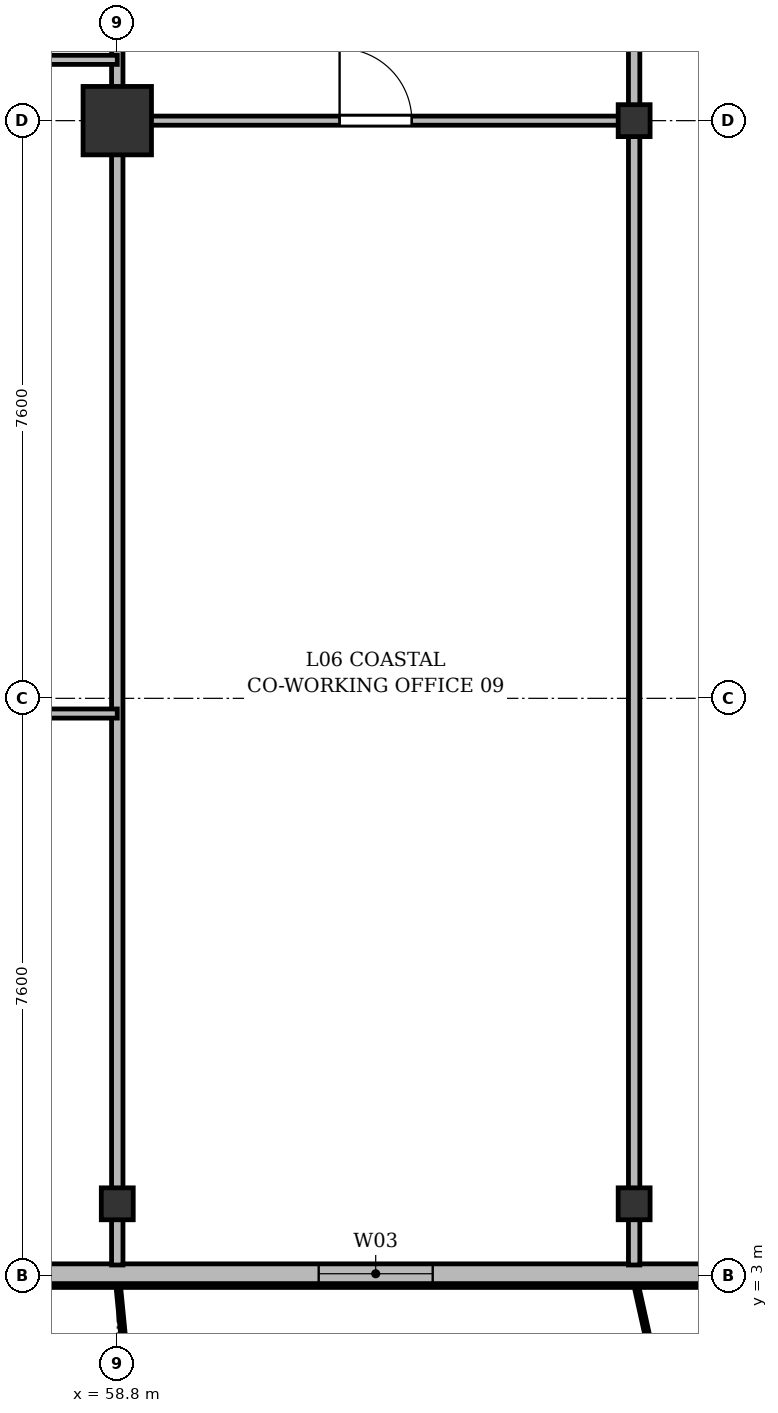
"""IFC4 building model, lengths in metres.
Left out: names, types, materials, properties, quantities, classifications, styles, units other than length and angle.
Written with IfcOpenShell. Run it as: python <this file> out.ifc"""

import sys

from ifc_helpers import new_model, si_unit, direction, frame, frame_2d, origin, origin_2d, place, context, subcontext, project, spatial, rectangle, i_section, extrude, source, transform, mapped, element, fill, save


model = new_model("IFC4")
c1 = context("Model", 3, precision=1e-05, world=origin(), true_north=direction((0.0, 1.0)))
c2 = subcontext(c1, "Body", "Model", "MODEL_VIEW")
j1 = project(units=[si_unit("LENGTHUNIT", "METRE"), si_unit("PLANEANGLEUNIT", "RADIAN")], contexts=[c1])
p1 = place(None, origin())
s1 = spatial("IfcSite", under=j1, at=p1, CompositionType="ELEMENT")
p2 = place(p1, origin())
s2 = spatial("IfcBuilding", under=s1, at=p2, CompositionType="ELEMENT")
p3 = place(p2, frame((0.0, 0.0, 27.1)))
s3 = spatial("IfcBuildingStorey", under=s2, at=p3, CompositionType="ELEMENT", Elevation=27.1)
m1 = source(origin(), c2, "Body", "SweptSolid", [
    extrude(i_section(OverallWidth=0.42, OverallDepth=0.42, WebThickness=0.026, FlangeThickness=0.04, at=origin_2d()), origin(), (0.0, 0.0, 1.0), 3.6),
])
p4 = place(p3, frame((58.8, 3.95, 0.0), z_axis=(0.0, 0.0, 1.0), x_axis=(1.0, 0.0, 0.0)))
e1 = element("IfcColumn", 1, at=p4, inside=s3, PredefinedType="COLUMN", context=c2, shape_type="MappedRepresentation", body=[
    mapped(m1, transform((0.0, 0.0, 0.0), x_axis=(1.0, 0.0, 0.0), y_axis=(0.0, 1.0, 0.0), z_axis=(0.0, 0.0, 1.0), scale=1.0)),
])
m2 = source(origin(), c2, "Body", "SweptSolid", [
    extrude(rectangle(XDim=0.9, YDim=0.9, at=origin_2d()), origin(), (0.0, 0.0, 1.0), 3.6),
])
p5 = place(p3, frame((58.8, 18.2, 0.0), z_axis=(0.0, 0.0, 1.0), x_axis=(1.0, 0.0, 0.0)))
e2 = element("IfcColumn", 2, at=p5, inside=s3, PredefinedType="COLUMN", context=c2, shape_type="MappedRepresentation", body=[
    mapped(m2, transform((0.0, 0.0, 0.0), x_axis=(1.0, 0.0, 0.0), y_axis=(0.0, 1.0, 0.0), z_axis=(0.0, 0.0, 1.0), scale=1.0)),
])
for number, where, z_axis, x_axis in (
    (3, (65.6, 3.95, 0.0), (0.0, 0.0, 1.0), (1.0, 0.0, 0.0)),
    (4, (65.6, 18.2, 0.0), (0.0, 0.0, 1.0), (1.0, 0.0, 0.0)),
):
    element("IfcColumn", number, at=place(p3, frame(where, z_axis=z_axis, x_axis=x_axis)), inside=s3, PredefinedType="COLUMN", context=c2, shape_type="MappedRepresentation", body=[
        mapped(m1, transform((0.0, 0.0, 0.0), x_axis=(1.0, 0.0, 0.0), y_axis=(0.0, 1.0, 0.0), z_axis=(0.0, 0.0, 1.0), scale=1.0)),
    ])
p6 = place(p3, frame((66.9, 3.03, 0.0), z_axis=(0.0, 0.0, 1.0), x_axis=(-1.0, 0.0, 0.0)))
e5 = element("IfcWall", 5, at=p6, inside=s3, PredefinedType="SOLIDWALL", context=c2, shape_type="SweptSolid", body=[
    extrude(rectangle(XDim=59.4, YDim=0.26, at=frame_2d((29.7, 0.0))), origin(), (0.0, 0.0, 1.0), 3.34),
])
p7 = place(p6, frame((3.95, 0.0, 0.9)))
e6 = element("IfcOpeningElement", 6, at=p7, cuts=e5, PredefinedType="OPENING", context=c2, shape_type="SweptSolid", body=[
    extrude(rectangle(XDim=1.5, YDim=1.75, at=frame_2d((0.75, 0.875))), frame((0.0, 0.14, 0.0), z_axis=(0.0, -1.0, 0.0), x_axis=(1.0, 0.0, 0.0)), (0.0, 0.0, 1.0), 0.28),
])
p8 = place(p6, frame((9.05, 0.0, 0.9)))
e7 = element("IfcOpeningElement", 7, at=p8, cuts=e5, PredefinedType="OPENING", context=c2, shape_type="SweptSolid", body=[
    extrude(rectangle(XDim=2.0, YDim=1.95, at=frame_2d((1.0, 0.975))), frame((0.0, 0.14, 0.0), z_axis=(0.0, -1.0, 0.0), x_axis=(1.0, 0.0, 0.0)), (0.0, 0.0, 1.0), 0.28),
])
p9 = place(p6, frame((13.125, 0.0, 0.9)))
e8 = element("IfcOpeningElement", 8, at=p9, cuts=e5, PredefinedType="OPENING", context=c2, shape_type="SweptSolid", body=[
    extrude(rectangle(XDim=1.65, YDim=1.85, at=frame_2d((0.825, 0.925))), frame((0.0, 0.14, 0.0), z_axis=(0.0, -1.0, 0.0), x_axis=(1.0, 0.0, 0.0)), (0.0, 0.0, 1.0), 0.28),
])
p10 = place(p6, frame((17.007, 0.0, 0.0)))
e9 = element("IfcOpeningElement", 9, at=p10, cuts=e5, PredefinedType="OPENING", context=c2, shape_type="SweptSolid", body=[
    extrude(rectangle(XDim=1.2, YDim=2.2, at=frame_2d((0.6, 1.1))), frame((0.0, 0.14, 0.0), z_axis=(0.0, -1.0, 0.0), x_axis=(1.0, 0.0, 0.0)), (0.0, 0.0, 1.0), 0.28),
])
p11 = place(p6, frame((20.2, 0.0, 0.9)))
e10 = element("IfcOpeningElement", 10, at=p11, cuts=e5, PredefinedType="OPENING", context=c2, shape_type="SweptSolid", body=[
    extrude(rectangle(XDim=2.2, YDim=1.8, at=frame_2d((1.1, 0.9))), frame((0.0, 0.14, 0.0), z_axis=(0.0, -1.0, 0.0), x_axis=(1.0, 0.0, 0.0)), (0.0, 0.0, 1.0), 0.28),
])
p12 = place(p6, frame((24.0, 0.0, 0.9)))
e11 = element("IfcOpeningElement", 11, at=p12, cuts=e5, PredefinedType="OPENING", context=c2, shape_type="SweptSolid", body=[
    extrude(rectangle(XDim=1.5, YDim=1.75, at=frame_2d((0.75, 0.875))), frame((0.0, 0.14, 0.0), z_axis=(0.0, -1.0, 0.0), x_axis=(1.0, 0.0, 0.0)), (0.0, 0.0, 1.0), 0.28),
])
p13 = place(p6, frame((27.05, 0.0, 0.9)))
e12 = element("IfcOpeningElement", 12, at=p13, cuts=e5, PredefinedType="OPENING", context=c2, shape_type="SweptSolid", body=[
    extrude(rectangle(XDim=2.0, YDim=1.95, at=frame_2d((1.0, 0.975))), frame((0.0, 0.14, 0.0), z_axis=(0.0, -1.0, 0.0), x_axis=(1.0, 0.0, 0.0)), (0.0, 0.0, 1.0), 0.28),
])
p14 = place(p6, frame((32.175, 0.0, 0.9)))
e13 = element("IfcOpeningElement", 13, at=p14, cuts=e5, PredefinedType="OPENING", context=c2, shape_type="SweptSolid", body=[
    extrude(rectangle(XDim=1.65, YDim=1.85, at=frame_2d((0.825, 0.925))), frame((0.0, 0.14, 0.0), z_axis=(0.0, -1.0, 0.0), x_axis=(1.0, 0.0, 0.0)), (0.0, 0.0, 1.0), 0.28),
])
p15 = place(p6, frame((36.6, 0.0, 0.9)))
e14 = element("IfcOpeningElement", 14, at=p15, cuts=e5, PredefinedType="OPENING", context=c2, shape_type="SweptSolid", body=[
    extrude(rectangle(XDim=1.8, YDim=1.8, at=frame_2d((0.9, 0.9))), frame((0.0, 0.14, 0.0), z_axis=(0.0, -1.0, 0.0), x_axis=(1.0, 0.0, 0.0)), (0.0, 0.0, 1.0), 0.28),
])
p16 = place(p6, frame((39.15, 0.0, 0.9)))
e15 = element("IfcOpeningElement", 15, at=p16, cuts=e5, PredefinedType="OPENING", context=c2, shape_type="SweptSolid", body=[
    extrude(rectangle(XDim=1.5, YDim=1.75, at=frame_2d((0.75, 0.875))), frame((0.0, 0.14, 0.0), z_axis=(0.0, -1.0, 0.0), x_axis=(1.0, 0.0, 0.0)), (0.0, 0.0, 1.0), 0.28),
])
p17 = place(p6, frame((41.55, 0.0, 0.9)))
e16 = element("IfcOpeningElement", 16, at=p17, cuts=e5, PredefinedType="OPENING", context=c2, shape_type="SweptSolid", body=[
    extrude(rectangle(XDim=1.5, YDim=1.75, at=frame_2d((0.75, 0.875))), frame((0.0, 0.14, 0.0), z_axis=(0.0, -1.0, 0.0), x_axis=(1.0, 0.0, 0.0)), (0.0, 0.0, 1.0), 0.28),
])
p18 = place(p6, frame((45.435, 0.0, 0.0)))
e17 = element("IfcOpeningElement", 17, at=p18, cuts=e5, PredefinedType="OPENING", context=c2, shape_type="SweptSolid", body=[
    extrude(rectangle(XDim=1.2, YDim=2.2, at=frame_2d((0.6, 1.1))), frame((0.0, 0.14, 0.0), z_axis=(0.0, -1.0, 0.0), x_axis=(1.0, 0.0, 0.0)), (0.0, 0.0, 1.0), 0.28),
])
p19 = place(p6, frame((48.525, 0.0, 0.9)))
e18 = element("IfcOpeningElement", 18, at=p19, cuts=e5, PredefinedType="OPENING", context=c2, shape_type="SweptSolid", body=[
    extrude(rectangle(XDim=1.65, YDim=1.85, at=frame_2d((0.825, 0.925))), frame((0.0, 0.14, 0.0), z_axis=(0.0, -1.0, 0.0), x_axis=(1.0, 0.0, 0.0)), (0.0, 0.0, 1.0), 0.28),
])
p20 = place(p6, frame((52.1, 0.0, 0.9)))
e19 = element("IfcOpeningElement", 19, at=p20, cuts=e5, PredefinedType="OPENING", context=c2, shape_type="SweptSolid", body=[
    extrude(rectangle(XDim=1.8, YDim=1.8, at=frame_2d((0.9, 0.9))), frame((0.0, 0.14, 0.0), z_axis=(0.0, -1.0, 0.0), x_axis=(1.0, 0.0, 0.0)), (0.0, 0.0, 1.0), 0.28),
])
p21 = place(p6, frame((55.3, 0.0, 0.9)))
e20 = element("IfcOpeningElement", 20, at=p21, cuts=e5, PredefinedType="OPENING", context=c2, shape_type="SweptSolid", body=[
    extrude(rectangle(XDim=2.2, YDim=1.8, at=frame_2d((1.1, 0.9))), frame((0.0, 0.14, 0.0), z_axis=(0.0, -1.0, 0.0), x_axis=(1.0, 0.0, 0.0)), (0.0, 0.0, 1.0), 0.28),
])
for number, where, z_axis, x_axis in (
    (21, (58.8, 3.145, 0.0), (0.0, 0.0, 1.0), (0.0, 1.0, 0.0)),
    (22, (65.6, 3.145, 0.0), (0.0, 0.0, 1.0), (0.0, 1.0, 0.0)),
):
    element("IfcWall", number, at=place(p3, frame(where, z_axis=z_axis, x_axis=x_axis)), inside=s3, PredefinedType="PARTITIONING", context=c2, shape_type="SweptSolid", body=[
        extrude(rectangle(XDim=24.455, YDim=0.15, at=frame_2d((12.228, 0.0))), origin(), (0.0, 0.0, 1.0), 2.752),
    ])
p22 = place(p3, frame((51.0, 19.0, 0.0), z_axis=(0.0, 0.0, 1.0), x_axis=(1.0, 0.0, 0.0)))
e23 = element("IfcWall", 23, at=p22, inside=s3, PredefinedType="PARTITIONING", context=c2, shape_type="SweptSolid", body=[
    extrude(rectangle(XDim=7.8, YDim=0.12, at=frame_2d((3.9, 0.0))), origin(), (0.0, 0.0, 1.0), 2.752),
])
p23 = place(p22, frame((3.333, 0.0, 0.0)))
e24 = element("IfcOpeningElement", 24, at=p23, cuts=e23, PredefinedType="OPENING", context=c2, shape_type="SweptSolid", body=[
    extrude(rectangle(XDim=0.95, YDim=2.15, at=frame_2d((0.475, 1.075))), frame((0.0, 0.07, 0.0), z_axis=(0.0, -1.0, 0.0), x_axis=(1.0, 0.0, 0.0)), (0.0, 0.0, 1.0), 0.14),
])
p24 = place(p3, frame((54.9, 10.4, 0.0), z_axis=(0.0, 0.0, 1.0), x_axis=(1.0, 0.0, 0.0)))
e25 = element("IfcWall", 25, at=p24, inside=s3, PredefinedType="PARTITIONING", context=c2, shape_type="SweptSolid", body=[
    extrude(rectangle(XDim=3.9, YDim=0.12, at=frame_2d((1.95, 0.0))), origin(), (0.0, 0.0, 1.0), 2.752),
])
p25 = place(p24, frame((1.475, 0.0, 0.0)))
e26 = element("IfcOpeningElement", 26, at=p25, cuts=e25, PredefinedType="OPENING", context=c2, shape_type="SweptSolid", body=[
    extrude(rectangle(XDim=0.95, YDim=2.15, at=frame_2d((0.475, 1.075))), frame((0.0, 0.07, 0.0), z_axis=(0.0, -1.0, 0.0), x_axis=(1.0, 0.0, 0.0)), (0.0, 0.0, 1.0), 0.14),
])
p26 = place(p3, frame((58.8, 18.2, 0.0), z_axis=(0.0, 0.0, 1.0), x_axis=(1.0, 0.0, 0.0)))
e27 = element("IfcWall", 27, at=p26, inside=s3, PredefinedType="PARTITIONING", context=c2, shape_type="SweptSolid", body=[
    extrude(rectangle(XDim=6.8, YDim=0.12, at=frame_2d((3.4, 0.0))), origin(), (0.0, 0.0, 1.0), 2.69),
])
p27 = place(p26, frame((2.925, 0.0, 0.0)))
e28 = element("IfcOpeningElement", 28, at=p27, cuts=e27, PredefinedType="OPENING", context=c2, shape_type="SweptSolid", body=[
    extrude(rectangle(XDim=0.95, YDim=2.15, at=frame_2d((0.475, 1.075))), frame((0.0, 0.07, 0.0), z_axis=(0.0, -1.0, 0.0), x_axis=(1.0, 0.0, 0.0)), (0.0, 0.0, 1.0), 0.14),
])
m3 = source(origin(), c2, "Body", "SweptSolid", [
    extrude(rectangle(XDim=1.5, YDim=1.75, at=frame_2d((0.75, 0.875))), frame((0.0, 0.03, 0.0), z_axis=(0.0, -1.0, 0.0), x_axis=(1.0, 0.0, 0.0)), (0.0, 0.0, 1.0), 0.06),
])
p28 = place(p7, origin())
e29 = element("IfcWindow", 29, at=p28, inside=s3, PartitioningType="SINGLE_PANEL", PredefinedType="WINDOW", context=c2, shape_type="MappedRepresentation", body=[
    mapped(m3, transform((0.0, 0.0, 0.0), x_axis=(1.0, 0.0, 0.0), y_axis=(0.0, 1.0, 0.0), z_axis=(0.0, 0.0, 1.0), scale=1.0)),
])
fill(e6, e29)
m4 = source(origin(), c2, "Body", "SweptSolid", [
    extrude(rectangle(XDim=0.95, YDim=2.15, at=frame_2d((0.475, 1.075))), frame((0.0, 0.025, 0.0), z_axis=(0.0, -1.0, 0.0), x_axis=(1.0, 0.0, 0.0)), (0.0, 0.0, 1.0), 0.05),
])
p29 = place(p27, origin())
e30 = element("IfcDoor", 30, at=p29, inside=s3, OperationType="SINGLE_SWING_LEFT", PredefinedType="DOOR", context=c2, shape_type="MappedRepresentation", body=[
    mapped(m4, transform((0.0, 0.0, 0.0), x_axis=(1.0, 0.0, 0.0), y_axis=(0.0, 1.0, 0.0), z_axis=(0.0, 0.0, 1.0), scale=1.0)),
])
fill(e28, e30)
save(model, sys.argv[1])
